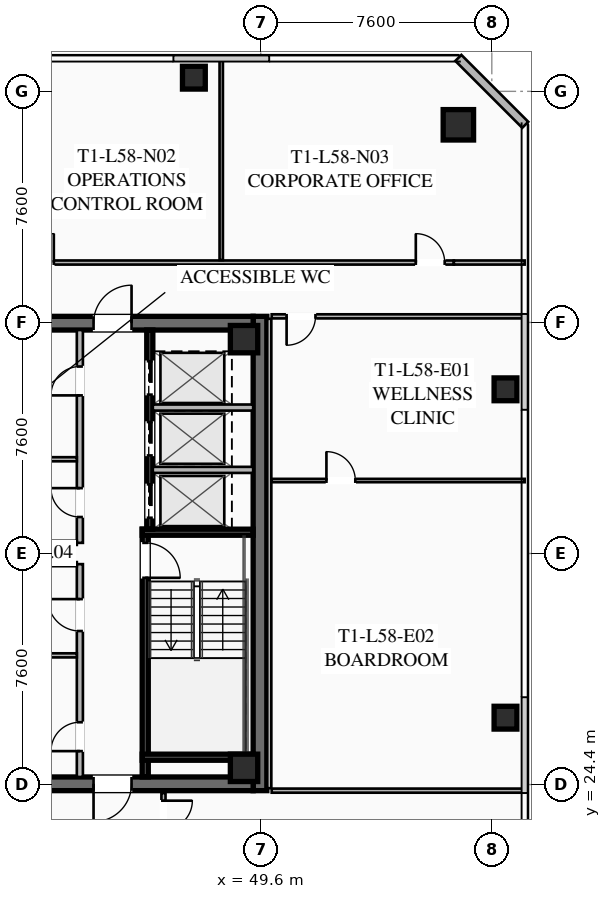
"""IFC4 building model, lengths in metres.
Left out: names, types, materials, properties, quantities, classifications, styles, units other than length and angle.
Written with IfcOpenShell. Run it as: python <this file> out.ifc"""

import sys

from ifc_helpers import new_model, si_unit, direction, frame, frame_2d, origin, origin_2d, place, context, subcontext, project, spatial, rectangle, hollow_rectangle, extrude, element, fill, save


model = new_model("IFC4")
c1 = context("Model", 3, precision=1e-05, world=origin(), true_north=direction((0.0, 1.0)))
c2 = subcontext(c1, "Body", "Model", "MODEL_VIEW")
j1 = project(units=[si_unit("LENGTHUNIT", "METRE"), si_unit("PLANEANGLEUNIT", "RADIAN")], contexts=[c1])
p1 = place(None, origin())
s1 = spatial("IfcSite", under=j1, at=p1, CompositionType="ELEMENT")
p2 = place(p1, origin())
s2 = spatial("IfcBuilding", under=s1, at=p2, CompositionType="ELEMENT")
p3 = place(p2, frame((0.0, 0.0, 214.85)))
s3 = spatial("IfcBuildingStorey", under=s2, at=p3, CompositionType="ELEMENT", Elevation=214.85)
p4 = place(p3, frame((49.575, 39.8, 0.0), z_axis=(0.0, 0.0, 1.0), x_axis=(0.0, -1.0, 0.0)))
e1 = element("IfcWall", 1, at=p4, inside=s3, PredefinedType="SHEAR", context=c2, shape_type="SweptSolid", body=[
    extrude(rectangle(XDim=15.6, YDim=0.45, at=frame_2d((7.8, 0.0))), origin(), (0.0, 0.0, 1.0), 3.55),
])
p5 = place(p3, frame((49.35, 24.425, 0.0), z_axis=(0.0, 0.0, 1.0), x_axis=(-1.0, 0.0, 0.0)))
e2 = element("IfcWall", 2, at=p5, inside=s3, PredefinedType="SHEAR", context=c2, shape_type="SweptSolid", body=[
    extrude(rectangle(XDim=14.7, YDim=0.45, at=frame_2d((7.35, 0.0))), origin(), (0.0, 0.0, 1.0), 3.55),
])
p6 = place(p5, frame((9.05, 0.0, 0.0)))
e3 = element("IfcOpeningElement", 3, at=p6, cuts=e2, PredefinedType="OPENING", context=c2, shape_type="SweptSolid", body=[
    extrude(rectangle(XDim=1.25, YDim=2.25, at=frame_2d((0.625, 1.125))), frame((0.0, 0.235, 0.0), z_axis=(0.0, -1.0, 0.0), x_axis=(1.0, 0.0, 0.0)), (0.0, 0.0, 1.0), 0.47),
])
p7 = place(p5, frame((4.0, 0.0, 0.0)))
e4 = element("IfcOpeningElement", 4, at=p7, cuts=e2, PredefinedType="OPENING", context=c2, shape_type="SweptSolid", body=[
    extrude(rectangle(XDim=1.25, YDim=2.25, at=frame_2d((0.625, 1.125))), frame((0.0, 0.235, 0.0), z_axis=(0.0, -1.0, 0.0), x_axis=(1.0, 0.0, 0.0)), (0.0, 0.0, 1.0), 0.47),
])
p8 = place(p3, frame((34.65, 39.575, 0.0), z_axis=(0.0, 0.0, 1.0), x_axis=(1.0, 0.0, 0.0)))
e5 = element("IfcWall", 5, at=p8, inside=s3, PredefinedType="SHEAR", context=c2, shape_type="SweptSolid", body=[
    extrude(rectangle(XDim=14.7, YDim=0.45, at=frame_2d((7.35, 0.0))), origin(), (0.0, 0.0, 1.0), 3.55),
])
p9 = place(p8, frame((4.4, 0.0, 0.0)))
e6 = element("IfcOpeningElement", 6, at=p9, cuts=e5, PredefinedType="OPENING", context=c2, shape_type="SweptSolid", body=[
    extrude(rectangle(XDim=1.25, YDim=2.25, at=frame_2d((0.625, 1.125))), frame((0.0, 0.235, 0.0), z_axis=(0.0, -1.0, 0.0), x_axis=(1.0, 0.0, 0.0)), (0.0, 0.0, 1.0), 0.47),
])
p10 = place(p8, frame((9.45, 0.0, 0.0)))
e7 = element("IfcOpeningElement", 7, at=p10, cuts=e5, PredefinedType="OPENING", context=c2, shape_type="SweptSolid", body=[
    extrude(rectangle(XDim=1.25, YDim=2.25, at=frame_2d((0.625, 1.125))), frame((0.0, 0.235, 0.0), z_axis=(0.0, -1.0, 0.0), x_axis=(1.0, 0.0, 0.0)), (0.0, 0.0, 1.0), 0.47),
])
for number, where, z_axis, x_axis in (
    (8, (49.05, 24.95, 0.0), (0.0, 0.0, 1.0), (1.0, 0.0, 0.0)),
    (9, (49.05, 39.05, 0.0), (0.0, 0.0, 1.0), (1.0, 0.0, 0.0)),
):
    element("IfcColumn", number, at=place(p3, frame(where, z_axis=z_axis, x_axis=x_axis)), inside=s3, PredefinedType="COLUMN", context=c2, shape_type="SweptSolid", body=[
        extrude(hollow_rectangle(XDim=0.9, YDim=0.9, WallThickness=0.04, at=origin_2d()), origin(), (0.0, 0.0, 1.0), 3.37),
    ])
p11 = place(p3, frame((56.1, 46.1, 0.0), z_axis=(0.0, 0.0, 1.0), x_axis=(1.0, 0.0, 0.0)))
e10 = element("IfcColumn", 10, at=p11, inside=s3, PredefinedType="COLUMN", context=c2, shape_type="SweptSolid", body=[
    extrude(hollow_rectangle(XDim=1.0, YDim=1.0, WallThickness=0.04, at=origin_2d()), origin(), (0.0, 0.0, 1.0), 3.37),
])
for number, where, z_axis, x_axis in (
    (11, (57.65, 26.6, 0.0), (0.0, 0.0, 1.0), (1.0, 0.0, 0.0)),
    (12, (57.65, 37.4, 0.0), (0.0, 0.0, 1.0), (1.0, 0.0, 0.0)),
    (13, (47.4, 47.65, 0.0), (0.0, 0.0, 1.0), (1.0, 0.0, 0.0)),
):
    element("IfcColumn", number, at=place(p3, frame(where, z_axis=z_axis, x_axis=x_axis)), inside=s3, PredefinedType="COLUMN", context=c2, shape_type="SweptSolid", body=[
        extrude(hollow_rectangle(XDim=0.75, YDim=0.75, WallThickness=0.032, at=origin_2d()), origin(), (0.0, 0.0, 1.0), 3.37),
    ])
p12 = place(p3, frame((56.1, 48.3, 0.0), z_axis=(0.0, 0.0, 1.0), x_axis=(0.707106781187, -0.707106781187, 0.0)))
e14 = element("IfcWall", 14, at=p12, inside=s3, PredefinedType="SOLIDWALL", context=c2, shape_type="SweptSolid", body=[
    extrude(rectangle(XDim=3.111, YDim=0.28, at=frame_2d((1.556, 0.0))), origin(), (0.0, 0.0, 1.0), 3.37),
])
p13 = place(p3, frame((45.8, 32.8, 0.0), z_axis=(0.0, 0.0, 1.0), x_axis=(0.0, -1.0, 0.0)))
e15 = element("IfcWall", 15, at=p13, inside=s3, PredefinedType="SHEAR", context=c2, shape_type="SweptSolid", body=[
    extrude(rectangle(XDim=8.15, YDim=0.2, at=frame_2d((4.075, 0.0))), origin(), (0.0, 0.0, 1.0), 3.37),
])
p14 = place(p13, frame((0.45, 0.0, 0.0)))
e16 = element("IfcOpeningElement", 16, at=p14, cuts=e15, PredefinedType="OPENING", context=c2, shape_type="SweptSolid", body=[
    extrude(rectangle(XDim=1.15, YDim=2.2, at=frame_2d((0.575, 1.1))), frame((0.0, 0.11, 0.0), z_axis=(0.0, -1.0, 0.0), x_axis=(1.0, 0.0, 0.0)), (0.0, 0.0, 1.0), 0.22),
])
for number, where, z_axis, x_axis in (
    (17, (45.7, 32.7, 0.0), (0.0, 0.0, 1.0), (1.0, 0.0, 0.0)),
    (18, (45.7, 25.3, 0.0), (0.0, 0.0, 1.0), (1.0, 0.0, 0.0)),
):
    element("IfcWall", number, at=place(p3, frame(where, z_axis=z_axis, x_axis=x_axis)), inside=s3, PredefinedType="SHEAR", context=c2, shape_type="SweptSolid", body=[
        extrude(rectangle(XDim=3.65, YDim=0.2, at=frame_2d((1.825, 0.0))), origin(), (0.0, 0.0, 1.0), 3.37),
    ])
p15 = place(p3, frame((45.95, 39.35, 0.0), z_axis=(0.0, 0.0, 1.0), x_axis=(0.0, -1.0, 0.0)))
e19 = element("IfcWall", 19, at=p15, inside=s3, PredefinedType="SHEAR", context=c2, shape_type="SweptSolid", body=[
    extrude(rectangle(XDim=6.55, YDim=0.2, at=frame_2d((3.275, 0.0))), origin(), (0.0, 0.0, 1.0), 3.37),
])
p16 = place(p15, frame((5.075, 0.0, 0.0)))
e20 = element("IfcOpeningElement", 20, at=p16, cuts=e19, PredefinedType="OPENING", context=c2, shape_type="SweptSolid", body=[
    extrude(rectangle(XDim=1.1, YDim=2.2, at=frame_2d((0.55, 1.1))), frame((0.0, 0.11, 0.0), z_axis=(0.0, -1.0, 0.0), x_axis=(1.0, 0.0, 0.0)), (0.0, 0.0, 1.0), 0.22),
])
p17 = place(p15, frame((3.025, 0.0, 0.0)))
e21 = element("IfcOpeningElement", 21, at=p17, cuts=e19, PredefinedType="OPENING", context=c2, shape_type="SweptSolid", body=[
    extrude(rectangle(XDim=1.1, YDim=2.2, at=frame_2d((0.55, 1.1))), frame((0.0, 0.11, 0.0), z_axis=(0.0, -1.0, 0.0), x_axis=(1.0, 0.0, 0.0)), (0.0, 0.0, 1.0), 0.22),
])
p18 = place(p15, frame((1.025, 0.0, 0.0)))
e22 = element("IfcOpeningElement", 22, at=p18, cuts=e19, PredefinedType="OPENING", context=c2, shape_type="SweptSolid", body=[
    extrude(rectangle(XDim=1.1, YDim=2.2, at=frame_2d((0.55, 1.1))), frame((0.0, 0.11, 0.0), z_axis=(0.0, -1.0, 0.0), x_axis=(1.0, 0.0, 0.0)), (0.0, 0.0, 1.0), 0.22),
])
for number, where, z_axis, x_axis in (
    (23, (46.05, 34.75, 0.0), (0.0, 0.0, 1.0), (1.0, 0.0, 0.0)),
    (24, (46.05, 36.8, 0.0), (0.0, 0.0, 1.0), (1.0, 0.0, 0.0)),
):
    element("IfcWall", number, at=place(p3, frame(where, z_axis=z_axis, x_axis=x_axis)), inside=s3, PredefinedType="SOLIDWALL", context=c2, shape_type="SweptSolid", body=[
        extrude(rectangle(XDim=3.3, YDim=0.2, at=frame_2d((1.65, 0.0))), origin(), (0.0, 0.0, 1.0), 3.37),
    ])
p19 = place(p3, frame((43.65, 24.65, 0.0), z_axis=(0.0, 0.0, 1.0), x_axis=(0.0, 1.0, 0.0)))
e25 = element("IfcWall", 25, at=p19, inside=s3, PredefinedType="SOLIDWALL", context=c2, shape_type="SweptSolid", body=[
    extrude(rectangle(XDim=7.0, YDim=0.2, at=frame_2d((3.5, 0.0))), origin(), (0.0, 0.0, 1.0), 2.723),
])
p20 = place(p19, frame((0.85, 0.0, 0.0)))
e26 = element("IfcOpeningElement", 26, at=p20, cuts=e25, PredefinedType="OPENING", context=c2, shape_type="SweptSolid", body=[
    extrude(rectangle(XDim=0.95, YDim=2.05, at=frame_2d((0.475, 1.025))), frame((0.0, 0.11, 0.0), z_axis=(0.0, -1.0, 0.0), x_axis=(1.0, 0.0, 0.0)), (0.0, 0.0, 1.0), 0.22),
])
p21 = place(p19, frame((4.8, 0.0, 0.0)))
e27 = element("IfcOpeningElement", 27, at=p21, cuts=e25, PredefinedType="OPENING", context=c2, shape_type="SweptSolid", body=[
    extrude(rectangle(XDim=1.05, YDim=2.2, at=frame_2d((0.525, 1.1))), frame((0.0, 0.11, 0.0), z_axis=(0.0, -1.0, 0.0), x_axis=(1.0, 0.0, 0.0)), (0.0, 0.0, 1.0), 0.22),
])
for number, where, z_axis, x_axis in (
    (28, (41.67, 31.65, 0.0), (0.0, 0.0, 1.0), (1.0, 0.0, 0.0)),
    (29, (41.67, 28.65, 0.0), (0.0, 0.0, 1.0), (1.0, 0.0, 0.0)),
):
    element("IfcWall", number, at=place(p3, frame(where, z_axis=z_axis, x_axis=x_axis)), inside=s3, PredefinedType="PARTITIONING", context=c2, shape_type="SweptSolid", body=[
        extrude(rectangle(XDim=1.88, YDim=0.135, at=frame_2d((0.94, 0.0))), origin(), (0.0, 0.0, 1.0), 2.723),
    ])
p22 = place(p3, frame((43.65, 32.35, 0.0), z_axis=(0.0, 0.0, 1.0), x_axis=(0.0, 1.0, 0.0)))
e30 = element("IfcWall", 30, at=p22, inside=s3, PredefinedType="SOLIDWALL", context=c2, shape_type="SweptSolid", body=[
    extrude(rectangle(XDim=7.0, YDim=0.2, at=frame_2d((3.5, 0.0))), origin(), (0.0, 0.0, 1.0), 2.723),
])
p23 = place(p22, frame((0.85, 0.0, 0.0)))
e31 = element("IfcOpeningElement", 31, at=p23, cuts=e30, PredefinedType="OPENING", context=c2, shape_type="SweptSolid", body=[
    extrude(rectangle(XDim=0.95, YDim=2.05, at=frame_2d((0.475, 1.025))), frame((0.0, 0.11, 0.0), z_axis=(0.0, -1.0, 0.0), x_axis=(1.0, 0.0, 0.0)), (0.0, 0.0, 1.0), 0.22),
])
p24 = place(p22, frame((4.85, 0.0, 0.0)))
e32 = element("IfcOpeningElement", 32, at=p24, cuts=e30, PredefinedType="OPENING", context=c2, shape_type="SweptSolid", body=[
    extrude(rectangle(XDim=0.95, YDim=2.05, at=frame_2d((0.475, 1.025))), frame((0.0, 0.11, 0.0), z_axis=(0.0, -1.0, 0.0), x_axis=(1.0, 0.0, 0.0)), (0.0, 0.0, 1.0), 0.22),
])
for number, where, z_axis, x_axis in (
    (33, (41.67, 32.35, 0.0), (0.0, 0.0, 1.0), (1.0, 0.0, 0.0)),
    (34, (41.67, 35.1, 0.0), (0.0, 0.0, 1.0), (1.0, 0.0, 0.0)),
):
    element("IfcWall", number, at=place(p3, frame(where, z_axis=z_axis, x_axis=x_axis)), inside=s3, PredefinedType="PARTITIONING", context=c2, shape_type="SweptSolid", body=[
        extrude(rectangle(XDim=1.88, YDim=0.135, at=frame_2d((0.94, 0.0))), origin(), (0.0, 0.0, 1.0), 2.723),
    ])
p25 = place(p3, frame((28.05, 41.57, 0.0), z_axis=(0.0, 0.0, 1.0), x_axis=(1.0, 0.0, 0.0)))
e35 = element("IfcWall", 35, at=p25, inside=s3, PredefinedType="PARTITIONING", context=c2, shape_type="SweptSolid", body=[
    extrude(rectangle(XDim=27.9, YDim=0.135, at=frame_2d((13.95, 0.0))), origin(), (0.0, 0.0, 1.0), 2.723),
])
p26 = place(p25, frame((0.3, 0.0, 0.0)))
e36 = element("IfcOpeningElement", 36, at=p26, cuts=e35, PredefinedType="OPENING", context=c2, shape_type="SweptSolid", body=[
    extrude(rectangle(XDim=0.95, YDim=2.05, at=frame_2d((0.475, 1.025))), frame((0.0, 0.077, 0.0), z_axis=(0.0, -1.0, 0.0), x_axis=(1.0, 0.0, 0.0)), (0.0, 0.0, 1.0), 0.155),
])
p27 = place(p25, frame((13.793, 0.0, 0.0)))
e37 = element("IfcOpeningElement", 37, at=p27, cuts=e35, PredefinedType="OPENING", context=c2, shape_type="SweptSolid", body=[
    extrude(rectangle(XDim=0.95, YDim=2.05, at=frame_2d((0.475, 1.025))), frame((0.0, 0.077, 0.0), z_axis=(0.0, -1.0, 0.0), x_axis=(1.0, 0.0, 0.0)), (0.0, 0.0, 1.0), 0.155),
])
p28 = place(p25, frame((26.65, 0.0, 0.0)))
e38 = element("IfcOpeningElement", 38, at=p28, cuts=e35, PredefinedType="OPENING", context=c2, shape_type="SweptSolid", body=[
    extrude(rectangle(XDim=0.95, YDim=2.05, at=frame_2d((0.475, 1.025))), frame((0.0, 0.077, 0.0), z_axis=(0.0, -1.0, 0.0), x_axis=(1.0, 0.0, 0.0)), (0.0, 0.0, 1.0), 0.155),
])
p29 = place(p3, frame((55.95, 41.57, 0.0), z_axis=(0.0, 0.0, 1.0), x_axis=(1.0, 0.0, 0.0)))
e39 = element("IfcWall", 39, at=p29, inside=s3, PredefinedType="PARTITIONING", context=c2, shape_type="SweptSolid", body=[
    extrude(rectangle(XDim=2.33, YDim=0.135, at=frame_2d((1.165, 0.0))), origin(), (0.0, 0.0, 1.0), 2.723),
])
p30 = place(p3, frame((48.3, 41.65, 0.0), z_axis=(0.0, 0.0, 1.0), x_axis=(0.0, 1.0, 0.0)))
e40 = element("IfcWall", 40, at=p30, inside=s3, PredefinedType="PARTITIONING", context=c2, shape_type="SweptSolid", body=[
    extrude(rectangle(XDim=6.63, YDim=0.11, at=frame_2d((3.315, 0.0))), origin(), (0.0, 0.0, 1.0), 2.723),
])
p31 = place(p3, frame((46.4, 24.12, 0.0), z_axis=(0.0, 0.0, 1.0), x_axis=(0.0, -1.0, 0.0)))
e41 = element("IfcWall", 41, at=p31, inside=s3, PredefinedType="PARTITIONING", context=c2, shape_type="SweptSolid", body=[
    extrude(rectangle(XDim=2.99, YDim=0.135, at=frame_2d((1.495, 0.0))), origin(), (0.0, 0.0, 1.0), 2.723),
])
p32 = place(p31, frame((0.25, 0.0, 0.0)))
e42 = element("IfcOpeningElement", 42, at=p32, cuts=e41, PredefinedType="OPENING", context=c2, shape_type="SweptSolid", body=[
    extrude(rectangle(XDim=0.95, YDim=2.05, at=frame_2d((0.475, 1.025))), frame((0.0, 0.077, 0.0), z_axis=(0.0, -1.0, 0.0), x_axis=(1.0, 0.0, 0.0)), (0.0, 0.0, 1.0), 0.155),
])
p33 = place(p3, frame((49.88, 39.72, 0.0), z_axis=(0.0, 0.0, 1.0), x_axis=(0.0, -1.0, 0.0)))
e43 = element("IfcWall", 43, at=p33, inside=s3, PredefinedType="PARTITIONING", context=c2, shape_type="SweptSolid", body=[
    extrude(rectangle(XDim=15.44, YDim=0.135, at=frame_2d((7.72, 0.0))), origin(), (0.0, 0.0, 1.0), 2.723),
])
p34 = place(p3, frame((58.28, 39.8, 0.0), z_axis=(0.0, 0.0, 1.0), x_axis=(-1.0, 0.0, 0.0)))
e44 = element("IfcWall", 44, at=p34, inside=s3, PredefinedType="PARTITIONING", context=c2, shape_type="SweptSolid", body=[
    extrude(rectangle(XDim=8.32, YDim=0.135, at=frame_2d((4.16, 0.0))), origin(), (0.0, 0.0, 1.0), 2.723),
])
p35 = place(p34, frame((6.88, 0.0, 0.0)))
e45 = element("IfcOpeningElement", 45, at=p35, cuts=e44, PredefinedType="OPENING", context=c2, shape_type="SweptSolid", body=[
    extrude(rectangle(XDim=0.95, YDim=2.05, at=frame_2d((0.475, 1.025))), frame((0.0, 0.077, 0.0), z_axis=(0.0, -1.0, 0.0), x_axis=(1.0, 0.0, 0.0)), (0.0, 0.0, 1.0), 0.155),
])
p36 = place(p3, frame((49.96, 24.2, 0.0), z_axis=(0.0, 0.0, 1.0), x_axis=(1.0, 0.0, 0.0)))
e46 = element("IfcWall", 46, at=p36, inside=s3, PredefinedType="PARTITIONING", context=c2, shape_type="SweptSolid", body=[
    extrude(rectangle(XDim=8.32, YDim=0.135, at=frame_2d((4.16, 0.0))), origin(), (0.0, 0.0, 1.0), 2.723),
])
p37 = place(p3, frame((49.96, 34.4, 0.0), z_axis=(0.0, 0.0, 1.0), x_axis=(1.0, 0.0, 0.0)))
e47 = element("IfcWall", 47, at=p37, inside=s3, PredefinedType="PARTITIONING", context=c2, shape_type="SweptSolid", body=[
    extrude(rectangle(XDim=8.32, YDim=0.11, at=frame_2d((4.16, 0.0))), origin(), (0.0, 0.0, 1.0), 2.723),
])
p38 = place(p37, frame((1.8, 0.0, 0.0)))
e48 = element("IfcOpeningElement", 48, at=p38, cuts=e47, PredefinedType="OPENING", context=c2, shape_type="SweptSolid", body=[
    extrude(rectangle(XDim=0.95, YDim=2.05, at=frame_2d((0.475, 1.025))), frame((0.0, 0.065, 0.0), z_axis=(0.0, -1.0, 0.0), x_axis=(1.0, 0.0, 0.0)), (0.0, 0.0, 1.0), 0.13),
])
p39 = place(p10, origin())
e49 = element("IfcDoor", 49, at=p39, inside=s3, OperationType="SINGLE_SWING_RIGHT", PredefinedType="DOOR", context=c2, shape_type="SweptSolid", body=[
    extrude(rectangle(XDim=1.25, YDim=2.25, at=frame_2d((0.625, 1.125))), frame((0.0, 0.025, 0.0), z_axis=(0.0, -1.0, 0.0), x_axis=(1.0, 0.0, 0.0)), (0.0, 0.0, 1.0), 0.05),
])
fill(e7, e49)
p40 = place(p7, origin())
e50 = element("IfcDoor", 50, at=p40, inside=s3, OperationType="SINGLE_SWING_RIGHT", PredefinedType="DOOR", context=c2, shape_type="SweptSolid", body=[
    extrude(rectangle(XDim=1.25, YDim=2.25, at=frame_2d((0.625, 1.125))), frame((0.0, 0.025, 0.0), z_axis=(0.0, -1.0, 0.0), x_axis=(1.0, 0.0, 0.0)), (0.0, 0.0, 1.0), 0.05),
])
fill(e4, e50)
p41 = place(p14, origin())
e51 = element("IfcDoor", 51, at=p41, inside=s3, OperationType="SINGLE_SWING_RIGHT", PredefinedType="DOOR", context=c2, shape_type="SweptSolid", body=[
    extrude(rectangle(XDim=1.15, YDim=2.2, at=frame_2d((0.575, 1.1))), frame((0.0, 0.025, 0.0), z_axis=(0.0, -1.0, 0.0), x_axis=(1.0, 0.0, 0.0)), (0.0, 0.0, 1.0), 0.05),
])
fill(e16, e51)
p42 = place(p20, origin())
e52 = element("IfcDoor", 52, at=p42, inside=s3, OperationType="SINGLE_SWING_LEFT", PredefinedType="DOOR", context=c2, shape_type="SweptSolid", body=[
    extrude(rectangle(XDim=0.95, YDim=2.05, at=frame_2d((0.475, 1.025))), frame((0.0, 0.025, 0.0), z_axis=(0.0, -1.0, 0.0), x_axis=(1.0, 0.0, 0.0)), (0.0, 0.0, 1.0), 0.05),
])
fill(e26, e52)
p43 = place(p21, origin())
e53 = element("IfcDoor", 53, at=p43, inside=s3, OperationType="SINGLE_SWING_RIGHT", PredefinedType="DOOR", context=c2, shape_type="SweptSolid", body=[
    extrude(rectangle(XDim=1.05, YDim=2.2, at=frame_2d((0.525, 1.1))), frame((0.0, 0.025, 0.0), z_axis=(0.0, -1.0, 0.0), x_axis=(1.0, 0.0, 0.0)), (0.0, 0.0, 1.0), 0.05),
])
fill(e27, e53)
p44 = place(p23, origin())
e54 = element("IfcDoor", 54, at=p44, inside=s3, OperationType="SINGLE_SWING_RIGHT", PredefinedType="DOOR", context=c2, shape_type="SweptSolid", body=[
    extrude(rectangle(XDim=0.95, YDim=2.05, at=frame_2d((0.475, 1.025))), frame((0.0, 0.025, 0.0), z_axis=(0.0, -1.0, 0.0), x_axis=(1.0, 0.0, 0.0)), (0.0, 0.0, 1.0), 0.05),
])
fill(e31, e54)
p45 = place(p24, origin())
e55 = element("IfcDoor", 55, at=p45, inside=s3, OperationType="SINGLE_SWING_LEFT", PredefinedType="DOOR", context=c2, shape_type="SweptSolid", body=[
    extrude(rectangle(XDim=0.95, YDim=2.05, at=frame_2d((0.475, 1.025))), frame((0.0, 0.025, 0.0), z_axis=(0.0, -1.0, 0.0), x_axis=(1.0, 0.0, 0.0)), (0.0, 0.0, 1.0), 0.05),
])
fill(e32, e55)
p46 = place(p27, origin())
e56 = element("IfcDoor", 56, at=p46, inside=s3, OperationType="SINGLE_SWING_RIGHT", PredefinedType="DOOR", context=c2, shape_type="SweptSolid", body=[
    extrude(rectangle(XDim=0.95, YDim=2.05, at=frame_2d((0.475, 1.025))), frame((0.0, 0.025, 0.0), z_axis=(0.0, -1.0, 0.0), x_axis=(1.0, 0.0, 0.0)), (0.0, 0.0, 1.0), 0.05),
])
fill(e37, e56)
p47 = place(p28, origin())
e57 = element("IfcDoor", 57, at=p47, inside=s3, OperationType="SINGLE_SWING_LEFT", PredefinedType="DOOR", context=c2, shape_type="SweptSolid", body=[
    extrude(rectangle(XDim=0.95, YDim=2.05, at=frame_2d((0.475, 1.025))), frame((0.0, 0.025, 0.0), z_axis=(0.0, -1.0, 0.0), x_axis=(1.0, 0.0, 0.0)), (0.0, 0.0, 1.0), 0.05),
])
fill(e38, e57)
p48 = place(p32, origin())
e58 = element("IfcDoor", 58, at=p48, inside=s3, OperationType="SINGLE_SWING_LEFT", PredefinedType="DOOR", context=c2, shape_type="SweptSolid", body=[
    extrude(rectangle(XDim=0.95, YDim=2.05, at=frame_2d((0.475, 1.025))), frame((0.0, 0.025, 0.0), z_axis=(0.0, -1.0, 0.0), x_axis=(1.0, 0.0, 0.0)), (0.0, 0.0, 1.0), 0.05),
])
fill(e42, e58)
p49 = place(p35, origin())
e59 = element("IfcDoor", 59, at=p49, inside=s3, OperationType="SINGLE_SWING_RIGHT", PredefinedType="DOOR", context=c2, shape_type="SweptSolid", body=[
    extrude(rectangle(XDim=0.95, YDim=2.05, at=frame_2d((0.475, 1.025))), frame((0.0, 0.025, 0.0), z_axis=(0.0, -1.0, 0.0), x_axis=(1.0, 0.0, 0.0)), (0.0, 0.0, 1.0), 0.05),
])
fill(e45, e59)
p50 = place(p38, origin())
e60 = element("IfcDoor", 60, at=p50, inside=s3, OperationType="SINGLE_SWING_LEFT", PredefinedType="DOOR", context=c2, shape_type="SweptSolid", body=[
    extrude(rectangle(XDim=0.95, YDim=2.05, at=frame_2d((0.475, 1.025))), frame((0.0, 0.025, 0.0), z_axis=(0.0, -1.0, 0.0), x_axis=(1.0, 0.0, 0.0)), (0.0, 0.0, 1.0), 0.05),
])
fill(e48, e60)
p51 = place(p16, origin())
e61 = element("IfcDoor", 61, at=p51, inside=s3, OperationType="SLIDING_TO_LEFT", PredefinedType="DOOR", context=c2, shape_type="SweptSolid", body=[
    extrude(rectangle(XDim=1.1, YDim=2.2, at=frame_2d((0.55, 1.1))), frame((0.0, 0.025, 0.0), z_axis=(0.0, -1.0, 0.0), x_axis=(1.0, 0.0, 0.0)), (0.0, 0.0, 1.0), 0.05),
])
fill(e20, e61)
p52 = place(p17, origin())
e62 = element("IfcDoor", 62, at=p52, inside=s3, OperationType="SLIDING_TO_LEFT", PredefinedType="DOOR", context=c2, shape_type="SweptSolid", body=[
    extrude(rectangle(XDim=1.1, YDim=2.2, at=frame_2d((0.55, 1.1))), frame((0.0, 0.025, 0.0), z_axis=(0.0, -1.0, 0.0), x_axis=(1.0, 0.0, 0.0)), (0.0, 0.0, 1.0), 0.05),
])
fill(e21, e62)
p53 = place(p18, origin())
e63 = element("IfcDoor", 63, at=p53, inside=s3, OperationType="SLIDING_TO_LEFT", PredefinedType="DOOR", context=c2, shape_type="SweptSolid", body=[
    extrude(rectangle(XDim=1.1, YDim=2.2, at=frame_2d((0.55, 1.1))), frame((0.0, 0.025, 0.0), z_axis=(0.0, -1.0, 0.0), x_axis=(1.0, 0.0, 0.0)), (0.0, 0.0, 1.0), 0.05),
])
fill(e22, e63)
save(model, sys.argv[1])
